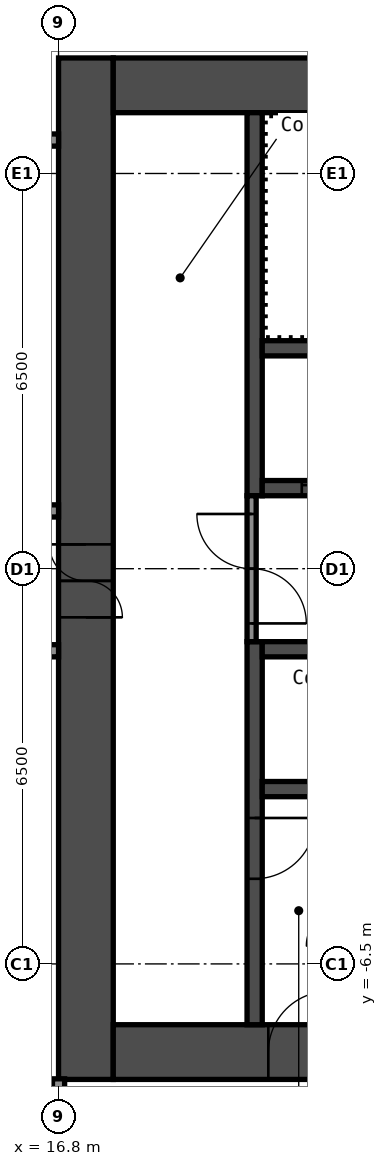
"""IFC4 building model, lengths in metres.
Left out: names, types, materials, properties, quantities, classifications, styles, units other than length and angle.
Written with IfcOpenShell. Run it as: python <this file> out.ifc"""

import sys

from ifc_helpers import new_model, si_unit, direction, frame, frame_2d, origin, place, context, subcontext, project, spatial, rectangle, extrude, element, fill, save


model = new_model("IFC4")
c1 = context("Model", 3, precision=1e-05, world=origin(), true_north=direction((0.0, 1.0)))
c2 = subcontext(c1, "Body", "Model", "MODEL_VIEW")
j1 = project(units=[si_unit("LENGTHUNIT", "METRE"), si_unit("PLANEANGLEUNIT", "RADIAN")], contexts=[c1])
p1 = place(None, origin())
s1 = spatial("IfcSite", under=j1, at=p1, CompositionType="ELEMENT")
p2 = place(p1, origin())
s2 = spatial("IfcBuilding", under=s1, at=p2, CompositionType="ELEMENT")
p3 = place(p2, frame((0.0, 0.0, 107.4)))
s3 = spatial("IfcBuildingStorey", under=s2, at=p3, CompositionType="ELEMENT", Elevation=107.4)
p4 = place(p3, frame((17.25, -8.4, 0.0), z_axis=(0.0, 0.0, 1.0), x_axis=(0.0, 1.0, 0.0)))
e1 = element("IfcWall", 1, at=p4, inside=s3, PredefinedType="SHEAR", context=c2, shape_type="SweptSolid", body=[
    extrude(rectangle(XDim=16.8, YDim=0.9, at=frame_2d((8.4, 0.0))), origin(), (0.0, 0.0, 1.0), 2.8),
])
p5 = place(p4, frame((7.6, 0.0, 0.0)))
e2 = element("IfcOpeningElement", 2, at=p5, cuts=e1, PredefinedType="OPENING", context=c2, shape_type="SweptSolid", body=[
    extrude(rectangle(XDim=1.2, YDim=2.1, at=frame_2d((0.6, 1.05))), frame((0.0, 0.46, 0.0), z_axis=(0.0, -1.0, 0.0), x_axis=(1.0, 0.0, 0.0)), (0.0, 0.0, 1.0), 0.92),
])
p6 = place(p3, frame((17.7, 7.95, 0.0), z_axis=(0.0, 0.0, 1.0), x_axis=(1.0, 0.0, 0.0)))
e3 = element("IfcWall", 3, at=p6, inside=s3, PredefinedType="SHEAR", context=c2, shape_type="SweptSolid", body=[
    extrude(rectangle(XDim=15.0, YDim=0.9, at=frame_2d((7.5, 0.0))), origin(), (0.0, 0.0, 1.0), 2.8),
])
p7 = place(p6, frame((10.4, 0.0, 0.0)))
e4 = element("IfcOpeningElement", 4, at=p7, cuts=e3, PredefinedType="OPENING", context=c2, shape_type="SweptSolid", body=[
    extrude(rectangle(XDim=1.2, YDim=2.1, at=frame_2d((0.6, 1.05))), frame((0.0, 0.46, 0.0), z_axis=(0.0, -1.0, 0.0), x_axis=(1.0, 0.0, 0.0)), (0.0, 0.0, 1.0), 0.92),
])
p8 = place(p6, frame((13.35, 0.0, 0.0)))
e5 = element("IfcOpeningElement", 5, at=p8, cuts=e3, PredefinedType="OPENING", context=c2, shape_type="SweptSolid", body=[
    extrude(rectangle(XDim=0.9, YDim=2.1, at=frame_2d((0.45, 1.05))), frame((0.0, 0.46, 0.0), z_axis=(0.0, -1.0, 0.0), x_axis=(1.0, 0.0, 0.0)), (0.0, 0.0, 1.0), 0.92),
])
p9 = place(p3, frame((17.7, -7.95, 0.0), z_axis=(0.0, 0.0, 1.0), x_axis=(1.0, 0.0, 0.0)))
e6 = element("IfcWall", 6, at=p9, inside=s3, PredefinedType="SHEAR", context=c2, shape_type="SweptSolid", body=[
    extrude(rectangle(XDim=15.0, YDim=0.9, at=frame_2d((7.5, 0.0))), origin(), (0.0, 0.0, 1.0), 2.8),
])
p10 = place(p9, frame((2.55, 0.0, 0.0)))
e7 = element("IfcOpeningElement", 7, at=p10, cuts=e6, PredefinedType="OPENING", context=c2, shape_type="SweptSolid", body=[
    extrude(rectangle(XDim=1.0, YDim=2.1, at=frame_2d((0.5, 1.05))), frame((0.0, 0.46, 0.0), z_axis=(0.0, -1.0, 0.0), x_axis=(1.0, 0.0, 0.0)), (0.0, 0.0, 1.0), 0.92),
])
p11 = place(p3, frame((20.025, 1.2, 0.0), z_axis=(0.0, 0.0, 1.0), x_axis=(0.0, 1.0, 0.0)))
e8 = element("IfcWall", 8, at=p11, inside=s3, PredefinedType="SHEAR", context=c2, shape_type="SweptSolid", body=[
    extrude(rectangle(XDim=6.3, YDim=0.25, at=frame_2d((3.15, 0.0))), origin(), (0.0, 0.0, 1.0), 2.8),
])
p12 = place(p3, frame((20.025, -7.5, 0.0), z_axis=(0.0, 0.0, 1.0), x_axis=(0.0, 1.0, 0.0)))
e9 = element("IfcWall", 9, at=p12, inside=s3, PredefinedType="SHEAR", context=c2, shape_type="SweptSolid", body=[
    extrude(rectangle(XDim=6.3, YDim=0.25, at=frame_2d((3.15, 0.0))), origin(), (0.0, 0.0, 1.0), 2.8),
])
p13 = place(p12, frame((2.4, 0.0, 0.0)))
e10 = element("IfcOpeningElement", 10, at=p13, cuts=e9, PredefinedType="OPENING", context=c2, shape_type="SweptSolid", body=[
    extrude(rectangle(XDim=1.0, YDim=2.1, at=frame_2d((0.5, 1.05))), frame((0.0, 0.135, 0.0), z_axis=(0.0, -1.0, 0.0), x_axis=(1.0, 0.0, 0.0)), (0.0, 0.0, 1.0), 0.27),
])
p14 = place(p3, frame((20.15, 1.325, 0.0), z_axis=(0.0, 0.0, 1.0), x_axis=(1.0, 0.0, 0.0)))
e11 = element("IfcWall", 11, at=p14, inside=s3, PredefinedType="SHEAR", context=c2, shape_type="SweptSolid", body=[
    extrude(rectangle(XDim=7.5, YDim=0.25, at=frame_2d((3.75, 0.0))), origin(), (0.0, 0.0, 1.0), 2.8),
])
p15 = place(p14, frame((0.65, 0.0, 0.0)))
e12 = element("IfcOpeningElement", 12, at=p15, cuts=e11, PredefinedType="OPENING", context=c2, shape_type="SweptSolid", body=[
    extrude(rectangle(XDim=1.1, YDim=2.1, at=frame_2d((0.55, 1.05))), frame((0.0, 0.135, 0.0), z_axis=(0.0, -1.0, 0.0), x_axis=(1.0, 0.0, 0.0)), (0.0, 0.0, 1.0), 0.27),
])
p16 = place(p14, frame((3.05, 0.0, 0.0)))
e13 = element("IfcOpeningElement", 13, at=p16, cuts=e11, PredefinedType="OPENING", context=c2, shape_type="SweptSolid", body=[
    extrude(rectangle(XDim=1.1, YDim=2.1, at=frame_2d((0.55, 1.05))), frame((0.0, 0.135, 0.0), z_axis=(0.0, -1.0, 0.0), x_axis=(1.0, 0.0, 0.0)), (0.0, 0.0, 1.0), 0.27),
])
p17 = place(p14, frame((5.45, 0.0, 0.0)))
e14 = element("IfcOpeningElement", 14, at=p17, cuts=e11, PredefinedType="OPENING", context=c2, shape_type="SweptSolid", body=[
    extrude(rectangle(XDim=1.1, YDim=2.1, at=frame_2d((0.55, 1.05))), frame((0.0, 0.135, 0.0), z_axis=(0.0, -1.0, 0.0), x_axis=(1.0, 0.0, 0.0)), (0.0, 0.0, 1.0), 0.27),
])
for number, where, z_axis, x_axis in (
    (15, (20.15, 3.625, 0.0), (0.0, 0.0, 1.0), (1.0, 0.0, 0.0)),
    (16, (20.15, -1.325, 0.0), (0.0, 0.0, 1.0), (1.0, 0.0, 0.0)),
    (17, (20.15, -3.625, 0.0), (0.0, 0.0, 1.0), (1.0, 0.0, 0.0)),
):
    element("IfcWall", number, at=place(p3, frame(where, z_axis=z_axis, x_axis=x_axis)), inside=s3, PredefinedType="SHEAR", context=c2, shape_type="SweptSolid", body=[
        extrude(rectangle(XDim=7.5, YDim=0.25, at=frame_2d((3.75, 0.0))), origin(), (0.0, 0.0, 1.0), 2.8),
    ])
p18 = place(p3, frame((19.975, -1.2, 0.0), z_axis=(0.0, 0.0, 1.0), x_axis=(0.0, 1.0, 0.0)))
e18 = element("IfcWall", 18, at=p18, inside=s3, PredefinedType="PARTITIONING", context=c2, shape_type="SweptSolid", body=[
    extrude(rectangle(XDim=2.4, YDim=0.15, at=frame_2d((1.2, 0.0))), origin(), (0.0, 0.0, 1.0), 2.8),
])
p19 = place(p18, frame((0.3, 0.0, 0.0)))
e19 = element("IfcOpeningElement", 19, at=p19, cuts=e18, PredefinedType="OPENING", context=c2, shape_type="SweptSolid", body=[
    extrude(rectangle(XDim=1.8, YDim=2.1, at=frame_2d((0.9, 1.05))), frame((0.0, 0.085, 0.0), z_axis=(0.0, -1.0, 0.0), x_axis=(1.0, 0.0, 0.0)), (0.0, 0.0, 1.0), 0.17),
])
p20 = place(p3, frame((-16.8, -1.35, 0.0), z_axis=(0.0, 0.0, 1.0), x_axis=(1.0, 0.0, 0.0)))
e20 = element("IfcWall", 20, at=p20, inside=s3, PredefinedType="PARTITIONING", context=c2, shape_type="SweptSolid", body=[
    extrude(rectangle(XDim=33.6, YDim=0.2, at=frame_2d((16.8, 0.0))), origin(), (0.0, 0.0, 1.0), 2.8),
])
p21 = place(p20, frame((5.4, 0.0, 0.0)))
e21 = element("IfcOpeningElement", 21, at=p21, cuts=e20, PredefinedType="OPENING", context=c2, shape_type="SweptSolid", body=[
    extrude(rectangle(XDim=1.0, YDim=2.1, at=frame_2d((0.5, 1.05))), frame((0.0, 0.11, 0.0), z_axis=(0.0, -1.0, 0.0), x_axis=(1.0, 0.0, 0.0)), (0.0, 0.0, 1.0), 0.22),
])
p22 = place(p20, frame((9.46, 0.0, 0.0)))
e22 = element("IfcOpeningElement", 22, at=p22, cuts=e20, PredefinedType="OPENING", context=c2, shape_type="SweptSolid", body=[
    extrude(rectangle(XDim=0.9, YDim=2.1, at=frame_2d((0.45, 1.05))), frame((0.0, 0.11, 0.0), z_axis=(0.0, -1.0, 0.0), x_axis=(1.0, 0.0, 0.0)), (0.0, 0.0, 1.0), 0.22),
])
p23 = place(p20, frame((13.66, 0.0, 0.0)))
e23 = element("IfcOpeningElement", 23, at=p23, cuts=e20, PredefinedType="OPENING", context=c2, shape_type="SweptSolid", body=[
    extrude(rectangle(XDim=0.9, YDim=2.1, at=frame_2d((0.45, 1.05))), frame((0.0, 0.11, 0.0), z_axis=(0.0, -1.0, 0.0), x_axis=(1.0, 0.0, 0.0)), (0.0, 0.0, 1.0), 0.22),
])
p24 = place(p20, frame((18.8, 0.0, 0.0)))
e24 = element("IfcOpeningElement", 24, at=p24, cuts=e20, PredefinedType="OPENING", context=c2, shape_type="SweptSolid", body=[
    extrude(rectangle(XDim=1.0, YDim=2.1, at=frame_2d((0.5, 1.05))), frame((0.0, 0.11, 0.0), z_axis=(0.0, -1.0, 0.0), x_axis=(1.0, 0.0, 0.0)), (0.0, 0.0, 1.0), 0.22),
])
p25 = place(p20, frame((30.6, 0.0, 0.0)))
e25 = element("IfcOpeningElement", 25, at=p25, cuts=e20, PredefinedType="OPENING", context=c2, shape_type="SweptSolid", body=[
    extrude(rectangle(XDim=1.0, YDim=2.1, at=frame_2d((0.5, 1.05))), frame((0.0, 0.11, 0.0), z_axis=(0.0, -1.0, 0.0), x_axis=(1.0, 0.0, 0.0)), (0.0, 0.0, 1.0), 0.22),
])
p26 = place(p3, frame((-16.8, 0.95, 0.0), z_axis=(0.0, 0.0, 1.0), x_axis=(1.0, 0.0, 0.0)))
e26 = element("IfcWall", 26, at=p26, inside=s3, PredefinedType="PARTITIONING", context=c2, shape_type="SweptSolid", body=[
    extrude(rectangle(XDim=33.6, YDim=0.2, at=frame_2d((16.8, 0.0))), origin(), (0.0, 0.0, 1.0), 2.8),
])
p27 = place(p26, frame((9.715, 0.0, 0.0)))
e27 = element("IfcOpeningElement", 27, at=p27, cuts=e26, PredefinedType="OPENING", context=c2, shape_type="SweptSolid", body=[
    extrude(rectangle(XDim=0.9, YDim=2.1, at=frame_2d((0.45, 1.05))), frame((0.0, 0.11, 0.0), z_axis=(0.0, -1.0, 0.0), x_axis=(1.0, 0.0, 0.0)), (0.0, 0.0, 1.0), 0.22),
])
p28 = place(p26, frame((13.915, 0.0, 0.0)))
e28 = element("IfcOpeningElement", 28, at=p28, cuts=e26, PredefinedType="OPENING", context=c2, shape_type="SweptSolid", body=[
    extrude(rectangle(XDim=0.9, YDim=2.1, at=frame_2d((0.45, 1.05))), frame((0.0, 0.11, 0.0), z_axis=(0.0, -1.0, 0.0), x_axis=(1.0, 0.0, 0.0)), (0.0, 0.0, 1.0), 0.22),
])
p29 = place(p26, frame((26.68, 0.0, 0.0)))
e29 = element("IfcOpeningElement", 29, at=p29, cuts=e26, PredefinedType="OPENING", context=c2, shape_type="SweptSolid", body=[
    extrude(rectangle(XDim=0.9, YDim=2.1, at=frame_2d((0.45, 1.05))), frame((0.0, 0.11, 0.0), z_axis=(0.0, -1.0, 0.0), x_axis=(1.0, 0.0, 0.0)), (0.0, 0.0, 1.0), 0.22),
])
p30 = place(p26, frame((30.88, 0.0, 0.0)))
e30 = element("IfcOpeningElement", 30, at=p30, cuts=e26, PredefinedType="OPENING", context=c2, shape_type="SweptSolid", body=[
    extrude(rectangle(XDim=0.9, YDim=2.1, at=frame_2d((0.45, 1.05))), frame((0.0, 0.11, 0.0), z_axis=(0.0, -1.0, 0.0), x_axis=(1.0, 0.0, 0.0)), (0.0, 0.0, 1.0), 0.22),
])
p31 = place(p3, frame((-16.8, 7.05, 0.0), z_axis=(0.0, 0.0, 1.0), x_axis=(1.0, 0.0, 0.0)))
e31 = element("IfcWall", 31, at=p31, inside=s3, PredefinedType="PARTITIONING", context=c2, shape_type="SweptSolid", body=[
    extrude(rectangle(XDim=33.6, YDim=0.2, at=frame_2d((16.8, 0.0))), origin(), (0.0, 0.0, 1.0), 2.8),
])
p32 = place(p31, frame((1.9, 0.0, 0.0)))
e32 = element("IfcOpeningElement", 32, at=p32, cuts=e31, PredefinedType="OPENING", context=c2, shape_type="SweptSolid", body=[
    extrude(rectangle(XDim=0.9, YDim=2.1, at=frame_2d((0.45, 1.05))), frame((0.0, 0.11, 0.0), z_axis=(0.0, -1.0, 0.0), x_axis=(1.0, 0.0, 0.0)), (0.0, 0.0, 1.0), 0.22),
])
p33 = place(p31, frame((6.1, 0.0, 0.0)))
e33 = element("IfcOpeningElement", 33, at=p33, cuts=e31, PredefinedType="OPENING", context=c2, shape_type="SweptSolid", body=[
    extrude(rectangle(XDim=0.9, YDim=2.1, at=frame_2d((0.45, 1.05))), frame((0.0, 0.11, 0.0), z_axis=(0.0, -1.0, 0.0), x_axis=(1.0, 0.0, 0.0)), (0.0, 0.0, 1.0), 0.22),
])
p34 = place(p31, frame((18.87, 0.0, 0.0)))
e34 = element("IfcOpeningElement", 34, at=p34, cuts=e31, PredefinedType="OPENING", context=c2, shape_type="SweptSolid", body=[
    extrude(rectangle(XDim=0.9, YDim=2.1, at=frame_2d((0.45, 1.05))), frame((0.0, 0.11, 0.0), z_axis=(0.0, -1.0, 0.0), x_axis=(1.0, 0.0, 0.0)), (0.0, 0.0, 1.0), 0.22),
])
p35 = place(p31, frame((23.07, 0.0, 0.0)))
e35 = element("IfcOpeningElement", 35, at=p35, cuts=e31, PredefinedType="OPENING", context=c2, shape_type="SweptSolid", body=[
    extrude(rectangle(XDim=0.9, YDim=2.1, at=frame_2d((0.45, 1.05))), frame((0.0, 0.11, 0.0), z_axis=(0.0, -1.0, 0.0), x_axis=(1.0, 0.0, 0.0)), (0.0, 0.0, 1.0), 0.22),
])
p36 = place(p3, frame((16.8, -15.55, 0.0), z_axis=(0.0, 0.0, 1.0), x_axis=(0.0, 1.0, 0.0)))
e36 = element("IfcWall", 36, at=p36, inside=s3, PredefinedType="PARTITIONING", context=c2, shape_type="SweptSolid", body=[
    extrude(rectangle(XDim=7.16, YDim=0.2, at=frame_2d((3.58, 0.0))), origin(), (0.0, 0.0, 1.0), 2.8),
])
p37 = place(p5, origin())
e37 = element("IfcDoor", 37, at=p37, inside=s3, OperationType="DOUBLE_DOOR_SINGLE_SWING", PredefinedType="DOOR", context=c2, shape_type="SweptSolid", body=[
    extrude(rectangle(XDim=1.2, YDim=2.1, at=frame_2d((0.6, 1.05))), frame((0.0, 0.025, 0.0), z_axis=(0.0, -1.0, 0.0), x_axis=(1.0, 0.0, 0.0)), (0.0, 0.0, 1.0), 0.05),
])
fill(e2, e37)
p38 = place(p10, origin())
e38 = element("IfcDoor", 38, at=p38, inside=s3, OperationType="SINGLE_SWING_LEFT", PredefinedType="DOOR", context=c2, shape_type="SweptSolid", body=[
    extrude(rectangle(XDim=1.0, YDim=2.1, at=frame_2d((0.5, 1.05))), frame((0.0, 0.025, 0.0), z_axis=(0.0, -1.0, 0.0), x_axis=(1.0, 0.0, 0.0)), (0.0, 0.0, 1.0), 0.05),
])
fill(e7, e38)
p39 = place(p13, origin())
e39 = element("IfcDoor", 39, at=p39, inside=s3, OperationType="SINGLE_SWING_RIGHT", PredefinedType="DOOR", context=c2, shape_type="SweptSolid", body=[
    extrude(rectangle(XDim=1.0, YDim=2.1, at=frame_2d((0.5, 1.05))), frame((0.0, 0.025, 0.0), z_axis=(0.0, -1.0, 0.0), x_axis=(1.0, 0.0, 0.0)), (0.0, 0.0, 1.0), 0.05),
])
fill(e10, e39)
p40 = place(p19, origin())
e40 = element("IfcDoor", 40, at=p40, inside=s3, OperationType="DOUBLE_DOOR_SINGLE_SWING", PredefinedType="DOOR", context=c2, shape_type="SweptSolid", body=[
    extrude(rectangle(XDim=1.8, YDim=2.1, at=frame_2d((0.9, 1.05))), frame((0.0, 0.025, 0.0), z_axis=(0.0, -1.0, 0.0), x_axis=(1.0, 0.0, 0.0)), (0.0, 0.0, 1.0), 0.05),
])
fill(e19, e40)
p41 = place(p15, origin())
e41 = element("IfcDoor", 41, at=p41, inside=s3, OperationType="DOUBLE_DOOR_SLIDING", PredefinedType="DOOR", context=c2, shape_type="SweptSolid", body=[
    extrude(rectangle(XDim=1.1, YDim=2.1, at=frame_2d((0.55, 1.05))), frame((0.0, 0.025, 0.0), z_axis=(0.0, -1.0, 0.0), x_axis=(1.0, 0.0, 0.0)), (0.0, 0.0, 1.0), 0.05),
])
fill(e12, e41)
save(model, sys.argv[1])
